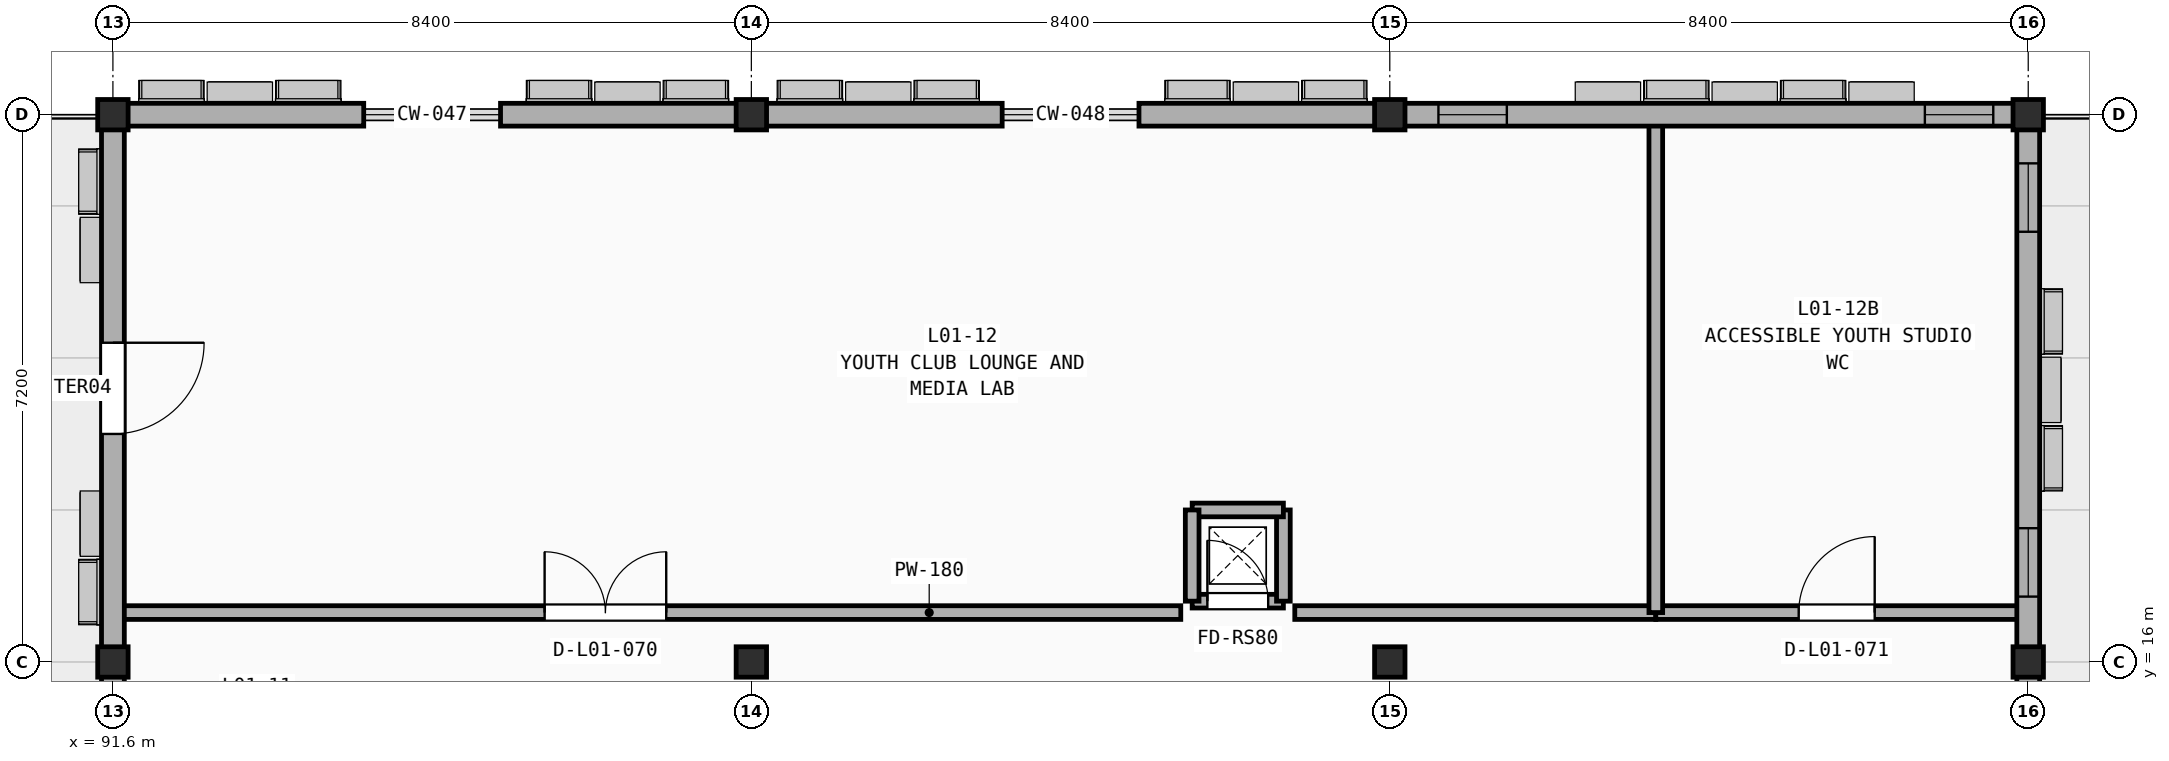
"""IFC4 building model, lengths in metres.
Left out: names, types, materials, properties, quantities, classifications, styles, units other than length and angle.
Written with IfcOpenShell. Run it as: python <this file> out.ifc"""

import sys

from ifc_helpers import new_model, si_unit, direction, frame, frame_2d, origin, origin_2d, place, context, subcontext, project, spatial, rectangle, extrude, element, fill, save


model = new_model("IFC4")
c1 = context("Model", 3, precision=1e-05, world=origin(), true_north=direction((0.0, 1.0)))
c2 = subcontext(c1, "Body", "Model", "MODEL_VIEW")
j1 = project(units=[si_unit("LENGTHUNIT", "METRE"), si_unit("PLANEANGLEUNIT", "RADIAN")], contexts=[c1])
p1 = place(None, origin())
s1 = spatial("IfcSite", under=j1, at=p1, CompositionType="ELEMENT")
p2 = place(p1, origin())
s2 = spatial("IfcBuilding", under=s1, at=p2, CompositionType="ELEMENT")
p3 = place(p2, frame((0.0, 0.0, 5.4)))
s3 = spatial("IfcBuildingStorey", under=s2, at=p3, CompositionType="ELEMENT", Elevation=5.4)
for number, where, z_axis, x_axis in (
    (1, (91.6, 16.0, 0.0), (0.0, 0.0, 1.0), (1.0, 0.0, 0.0)),
    (2, (91.6, 23.2, 0.0), (0.0, 0.0, 1.0), (1.0, 0.0, 0.0)),
    (3, (100.0, 16.0, 0.0), (0.0, 0.0, 1.0), (1.0, 0.0, 0.0)),
    (4, (100.0, 23.2, 0.0), (0.0, 0.0, 1.0), (1.0, 0.0, 0.0)),
    (5, (108.4, 16.0, 0.0), (0.0, 0.0, 1.0), (1.0, 0.0, 0.0)),
    (6, (108.4, 23.2, 0.0), (0.0, 0.0, 1.0), (1.0, 0.0, 0.0)),
    (7, (116.8, 16.0, 0.0), (0.0, 0.0, 1.0), (1.0, 0.0, 0.0)),
    (8, (116.8, 23.2, 0.0), (0.0, 0.0, 1.0), (1.0, 0.0, 0.0)),
):
    element("IfcColumn", number, at=place(p3, frame(where, z_axis=z_axis, x_axis=x_axis)), inside=s3, PredefinedType="COLUMN", context=c2, shape_type="SweptSolid", body=[
        extrude(rectangle(XDim=0.4, YDim=0.4, at=origin_2d()), origin(), (0.0, 0.0, 1.0), 4.2),
    ])
p4 = place(p3, frame((91.74, 16.65, 0.0), z_axis=(0.0, 0.0, 1.0), x_axis=(1.0, 0.0, 0.0)))
e9 = element("IfcWall", 9, at=p4, inside=s3, PredefinedType="PARTITIONING", context=c2, shape_type="SweptSolid", body=[
    extrude(rectangle(XDim=13.91, YDim=0.18, at=frame_2d((6.955, 0.0))), origin(), (0.0, 0.0, 1.0), 3.21),
])
p5 = place(p4, frame((5.54, 0.0, -0.01)))
e10 = element("IfcOpeningElement", 10, at=p5, cuts=e9, PredefinedType="OPENING", context=c2, shape_type="SweptSolid", body=[
    extrude(rectangle(XDim=1.6, YDim=2.21, at=frame_2d((0.8, 1.105))), frame((0.0, 0.1, 0.0), z_axis=(0.0, -1.0, 0.0), x_axis=(1.0, 0.0, 0.0)), (0.0, 0.0, 1.0), 0.2),
])
p6 = place(p3, frame((107.15, 16.65, 0.0), z_axis=(0.0, 0.0, 1.0), x_axis=(1.0, 0.0, 0.0)))
e11 = element("IfcWall", 11, at=p6, inside=s3, PredefinedType="PARTITIONING", context=c2, shape_type="SweptSolid", body=[
    extrude(rectangle(XDim=4.75, YDim=0.18, at=frame_2d((2.375, 0.0))), origin(), (0.0, 0.0, 1.0), 3.37),
])
p7 = place(p3, frame((111.9, 16.65, 0.0), z_axis=(0.0, 0.0, 1.0), x_axis=(1.0, 0.0, 0.0)))
e12 = element("IfcWall", 12, at=p7, inside=s3, PredefinedType="PARTITIONING", context=c2, shape_type="SweptSolid", body=[
    extrude(rectangle(XDim=4.76, YDim=0.18, at=frame_2d((2.38, 0.0))), origin(), (0.0, 0.0, 1.0), 3.21),
])
p8 = place(p7, frame((1.88, 0.0, -0.01)))
e13 = element("IfcOpeningElement", 13, at=p8, cuts=e12, PredefinedType="OPENING", context=c2, shape_type="SweptSolid", body=[
    extrude(rectangle(XDim=1.0, YDim=2.16, at=frame_2d((0.5, 1.08))), frame((0.0, 0.1, 0.0), z_axis=(0.0, -1.0, 0.0), x_axis=(1.0, 0.0, 0.0)), (0.0, 0.0, 1.0), 0.2),
])
p9 = place(p3, frame((111.9, 16.65, 0.0), z_axis=(0.0, 0.0, 1.0), x_axis=(0.0, 1.0, 0.0)))
e14 = element("IfcWall", 14, at=p9, inside=s3, PredefinedType="PARTITIONING", context=c2, shape_type="SweptSolid", body=[
    extrude(rectangle(XDim=6.41, YDim=0.18, at=frame_2d((3.205, 0.0))), origin(), (0.0, 0.0, 1.0), 3.52),
])
p10 = place(p3, frame((100.0, 23.2, 0.0), z_axis=(0.0, 0.0, 1.0), x_axis=(-1.0, 0.0, 0.0)))
e15 = element("IfcWall", 15, at=p10, inside=s3, PredefinedType="SOLIDWALL", context=c2, shape_type="SweptSolid", body=[
    extrude(rectangle(XDim=3.3, YDim=0.3, at=frame_2d((1.65, 0.0))), origin(), (0.0, 0.0, 1.0), 3.21),
])
p11 = place(p3, frame((94.9, 23.2, 0.0), z_axis=(0.0, 0.0, 1.0), x_axis=(-1.0, 0.0, 0.0)))
e16 = element("IfcWall", 16, at=p11, inside=s3, PredefinedType="SOLIDWALL", context=c2, shape_type="SweptSolid", body=[
    extrude(rectangle(XDim=3.3, YDim=0.3, at=frame_2d((1.65, 0.0))), origin(), (0.0, 0.0, 1.0), 3.21),
])
p12 = place(p3, frame((108.4, 23.2, 0.0), z_axis=(0.0, 0.0, 1.0), x_axis=(-1.0, 0.0, 0.0)))
e17 = element("IfcWall", 17, at=p12, inside=s3, PredefinedType="SOLIDWALL", context=c2, shape_type="SweptSolid", body=[
    extrude(rectangle(XDim=3.3, YDim=0.3, at=frame_2d((1.65, 0.0))), origin(), (0.0, 0.0, 1.0), 3.37),
])
p13 = place(p3, frame((103.3, 23.2, 0.0), z_axis=(0.0, 0.0, 1.0), x_axis=(-1.0, 0.0, 0.0)))
e18 = element("IfcWall", 18, at=p13, inside=s3, PredefinedType="SOLIDWALL", context=c2, shape_type="SweptSolid", body=[
    extrude(rectangle(XDim=3.3, YDim=0.3, at=frame_2d((1.65, 0.0))), origin(), (0.0, 0.0, 1.0), 3.37),
])
p14 = place(p3, frame((116.8, 23.2, 0.0), z_axis=(0.0, 0.0, 1.0), x_axis=(-1.0, 0.0, 0.0)))
e19 = element("IfcWall", 19, at=p14, inside=s3, PredefinedType="SOLIDWALL", context=c2, shape_type="SweptSolid", body=[
    extrude(rectangle(XDim=8.4, YDim=0.3, at=frame_2d((4.2, 0.0))), origin(), (0.0, 0.0, 1.0), 3.21),
])
p15 = place(p14, frame((0.46, 0.0, 0.85)))
e20 = element("IfcOpeningElement", 20, at=p15, cuts=e19, PredefinedType="OPENING", context=c2, shape_type="SweptSolid", body=[
    extrude(rectangle(XDim=0.9, YDim=2.15, at=frame_2d((0.45, 1.075))), frame((0.0, 0.16, 0.0), z_axis=(0.0, -1.0, 0.0), x_axis=(1.0, 0.0, 0.0)), (0.0, 0.0, 1.0), 0.32),
])
p16 = place(p14, frame((6.86, 0.0, 0.85)))
e21 = element("IfcOpeningElement", 21, at=p16, cuts=e19, PredefinedType="OPENING", context=c2, shape_type="SweptSolid", body=[
    extrude(rectangle(XDim=0.9, YDim=2.15, at=frame_2d((0.45, 1.075))), frame((0.0, 0.16, 0.0), z_axis=(0.0, -1.0, 0.0), x_axis=(1.0, 0.0, 0.0)), (0.0, 0.0, 1.0), 0.32),
])
p17 = place(p3, frame((91.6, 16.0, 0.0), z_axis=(0.0, 0.0, 1.0), x_axis=(0.0, -1.0, 0.0)))
e22 = element("IfcWall", 22, at=p17, inside=s3, PredefinedType="SOLIDWALL", context=c2, shape_type="SweptSolid", body=[
    extrude(rectangle(XDim=2.7, YDim=0.3, at=frame_2d((1.35, 0.0))), origin(), (0.0, 0.0, 1.0), 3.21),
])
p18 = place(p3, frame((91.6, 23.2, 0.0), z_axis=(0.0, 0.0, 1.0), x_axis=(0.0, -1.0, 0.0)))
e23 = element("IfcWall", 23, at=p18, inside=s3, PredefinedType="SOLIDWALL", context=c2, shape_type="SweptSolid", body=[
    extrude(rectangle(XDim=7.2, YDim=0.3, at=frame_2d((3.6, 0.0))), origin(), (0.0, 0.0, 1.0), 3.21),
])
p19 = place(p18, frame((3.0, 0.0, -0.01)))
e24 = element("IfcOpeningElement", 24, at=p19, cuts=e23, PredefinedType="OPENING", context=c2, shape_type="SweptSolid", body=[
    extrude(rectangle(XDim=1.2, YDim=2.21, at=frame_2d((0.6, 1.105))), frame((0.0, 0.16, 0.0), z_axis=(0.0, -1.0, 0.0), x_axis=(1.0, 0.0, 0.0)), (0.0, 0.0, 1.0), 0.32),
])
p20 = place(p3, frame((116.8, 8.8, 0.0), z_axis=(0.0, 0.0, 1.0), x_axis=(0.0, 1.0, 0.0)))
e25 = element("IfcWall", 25, at=p20, inside=s3, PredefinedType="SOLIDWALL", context=c2, shape_type="SweptSolid", body=[
    extrude(rectangle(XDim=7.2, YDim=0.3, at=frame_2d((3.6, 0.0))), origin(), (0.0, 0.0, 1.0), 3.21),
])
p21 = place(p20, frame((3.0, 0.0, -0.01)))
e26 = element("IfcOpeningElement", 26, at=p21, cuts=e25, PredefinedType="OPENING", context=c2, shape_type="SweptSolid", body=[
    extrude(rectangle(XDim=1.2, YDim=2.21, at=frame_2d((0.6, 1.105))), frame((0.0, 0.16, 0.0), z_axis=(0.0, -1.0, 0.0), x_axis=(1.0, 0.0, 0.0)), (0.0, 0.0, 1.0), 0.32),
])
p22 = place(p3, frame((116.8, 16.0, 0.0), z_axis=(0.0, 0.0, 1.0), x_axis=(0.0, 1.0, 0.0)))
e27 = element("IfcWall", 27, at=p22, inside=s3, PredefinedType="SOLIDWALL", context=c2, shape_type="SweptSolid", body=[
    extrude(rectangle(XDim=7.2, YDim=0.3, at=frame_2d((3.6, 0.0))), origin(), (0.0, 0.0, 1.0), 3.21),
])
p23 = place(p22, frame((0.86, 0.0, 0.85)))
e28 = element("IfcOpeningElement", 28, at=p23, cuts=e27, PredefinedType="OPENING", context=c2, shape_type="SweptSolid", body=[
    extrude(rectangle(XDim=0.9, YDim=2.15, at=frame_2d((0.45, 1.075))), frame((0.0, 0.16, 0.0), z_axis=(0.0, -1.0, 0.0), x_axis=(1.0, 0.0, 0.0)), (0.0, 0.0, 1.0), 0.32),
])
p24 = place(p22, frame((5.66, 0.0, 0.85)))
e29 = element("IfcOpeningElement", 29, at=p24, cuts=e27, PredefinedType="OPENING", context=c2, shape_type="SweptSolid", body=[
    extrude(rectangle(XDim=0.9, YDim=2.15, at=frame_2d((0.45, 1.075))), frame((0.0, 0.16, 0.0), z_axis=(0.0, -1.0, 0.0), x_axis=(1.0, 0.0, 0.0)), (0.0, 0.0, 1.0), 0.32),
])
p25 = place(p3, frame((105.8, 16.8, 0.0), z_axis=(0.0, 0.0, 1.0), x_axis=(1.0, 0.0, 0.0)))
e30 = element("IfcWall", 30, at=p25, inside=s3, PredefinedType="SOLIDWALL", context=c2, shape_type="SweptSolid", body=[
    extrude(rectangle(XDim=1.2, YDim=0.18, at=frame_2d((0.6, 0.0))), origin(), (0.0, 0.0, 1.0), 3.97),
])
p26 = place(p25, frame((0.2, 0.0, -0.01)))
e31 = element("IfcOpeningElement", 31, at=p26, cuts=e30, PredefinedType="OPENING", context=c2, shape_type="SweptSolid", body=[
    extrude(rectangle(XDim=0.8, YDim=2.06, at=frame_2d((0.4, 1.03))), frame((0.0, 0.1, 0.0), z_axis=(0.0, -1.0, 0.0), x_axis=(1.0, 0.0, 0.0)), (0.0, 0.0, 1.0), 0.2),
])
for number, where, z_axis, x_axis in (
    (32, (107.0, 16.8, 0.0), (0.0, 0.0, 1.0), (0.0, 1.0, 0.0)),
    (33, (107.0, 18.0, 0.0), (0.0, 0.0, 1.0), (-1.0, 0.0, 0.0)),
    (34, (105.8, 18.0, 0.0), (0.0, 0.0, 1.0), (0.0, -1.0, 0.0)),
):
    element("IfcWall", number, at=place(p3, frame(where, z_axis=z_axis, x_axis=x_axis)), inside=s3, PredefinedType="SOLIDWALL", context=c2, shape_type="SweptSolid", body=[
        extrude(rectangle(XDim=1.2, YDim=0.18, at=frame_2d((0.6, 0.0))), origin(), (0.0, 0.0, 1.0), 3.97),
    ])
p27 = place(p5, frame((0.0, 0.0, 0.01)))
e35 = element("IfcDoor", 35, at=p27, inside=s3, OperationType="DOUBLE_SWING_LEFT", PredefinedType="DOOR", context=c2, shape_type="SweptSolid", body=[
    extrude(rectangle(XDim=1.6, YDim=2.2, at=frame_2d((0.8, 1.1))), frame((0.0, 0.025, 0.0), z_axis=(0.0, -1.0, 0.0), x_axis=(1.0, 0.0, 0.0)), (0.0, 0.0, 1.0), 0.05),
])
fill(e10, e35)
p28 = place(p8, frame((0.0, 0.0, 0.01)))
e36 = element("IfcDoor", 36, at=p28, inside=s3, OperationType="SINGLE_SWING_RIGHT", PredefinedType="DOOR", context=c2, shape_type="SweptSolid", body=[
    extrude(rectangle(XDim=1.0, YDim=2.15, at=frame_2d((0.5, 1.075))), frame((0.0, 0.025, 0.0), z_axis=(0.0, -1.0, 0.0), x_axis=(1.0, 0.0, 0.0)), (0.0, 0.0, 1.0), 0.05),
])
fill(e13, e36)
p29 = place(p15, origin())
e37 = element("IfcWindow", 37, at=p29, inside=s3, PartitioningType="SINGLE_PANEL", PredefinedType="WINDOW", context=c2, shape_type="SweptSolid", body=[
    extrude(rectangle(XDim=0.9, YDim=2.15, at=frame_2d((0.45, 1.075))), frame((0.0, 0.03, 0.0), z_axis=(0.0, -1.0, 0.0), x_axis=(1.0, 0.0, 0.0)), (0.0, 0.0, 1.0), 0.06),
])
fill(e20, e37)
p30 = place(p16, origin())
e38 = element("IfcWindow", 38, at=p30, inside=s3, PartitioningType="SINGLE_PANEL", PredefinedType="WINDOW", context=c2, shape_type="SweptSolid", body=[
    extrude(rectangle(XDim=0.9, YDim=2.15, at=frame_2d((0.45, 1.075))), frame((0.0, 0.03, 0.0), z_axis=(0.0, -1.0, 0.0), x_axis=(1.0, 0.0, 0.0)), (0.0, 0.0, 1.0), 0.06),
])
fill(e21, e38)
p31 = place(p19, frame((0.0, 0.0, 0.01)))
e39 = element("IfcDoor", 39, at=p31, inside=s3, OperationType="SINGLE_SWING_LEFT", PredefinedType="DOOR", context=c2, shape_type="SweptSolid", body=[
    extrude(rectangle(XDim=1.2, YDim=2.2, at=frame_2d((0.6, 1.1))), frame((0.0, 0.025, 0.0), z_axis=(0.0, -1.0, 0.0), x_axis=(1.0, 0.0, 0.0)), (0.0, 0.0, 1.0), 0.05),
])
fill(e24, e39)
p32 = place(p23, origin())
e40 = element("IfcWindow", 40, at=p32, inside=s3, PartitioningType="SINGLE_PANEL", PredefinedType="WINDOW", context=c2, shape_type="SweptSolid", body=[
    extrude(rectangle(XDim=0.9, YDim=2.15, at=frame_2d((0.45, 1.075))), frame((0.0, 0.03, 0.0), z_axis=(0.0, -1.0, 0.0), x_axis=(1.0, 0.0, 0.0)), (0.0, 0.0, 1.0), 0.06),
])
fill(e28, e40)
p33 = place(p24, origin())
e41 = element("IfcWindow", 41, at=p33, inside=s3, PartitioningType="SINGLE_PANEL", PredefinedType="WINDOW", context=c2, shape_type="SweptSolid", body=[
    extrude(rectangle(XDim=0.9, YDim=2.15, at=frame_2d((0.45, 1.075))), frame((0.0, 0.03, 0.0), z_axis=(0.0, -1.0, 0.0), x_axis=(1.0, 0.0, 0.0)), (0.0, 0.0, 1.0), 0.06),
])
fill(e29, e41)
p34 = place(p26, frame((0.0, 0.0, 0.01)))
e42 = element("IfcDoor", 42, at=p34, inside=s3, OperationType="SINGLE_SWING_LEFT", PredefinedType="DOOR", context=c2, shape_type="SweptSolid", body=[
    extrude(rectangle(XDim=0.8, YDim=2.05, at=frame_2d((0.4, 1.025))), frame((0.0, 0.025, 0.0), z_axis=(0.0, -1.0, 0.0), x_axis=(1.0, 0.0, 0.0)), (0.0, 0.0, 1.0), 0.05),
])
fill(e31, e42)
save(model, sys.argv[1])
